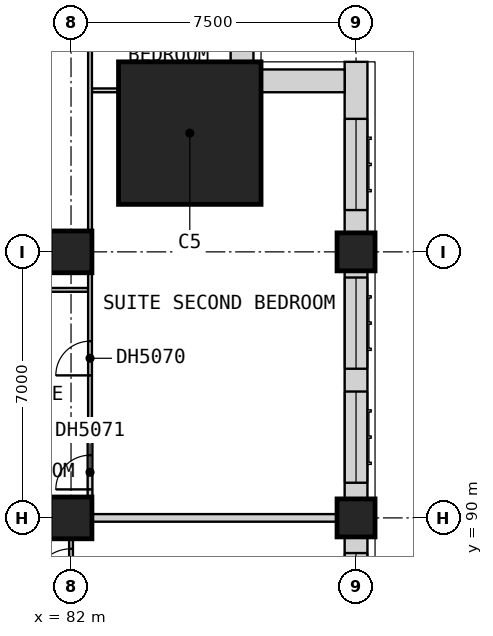
"""IFC4 building model, lengths in metres.
Left out: names, types, materials, properties, quantities, classifications, styles, units other than length and angle.
Written with IfcOpenShell. Run it as: python <this file> out.ifc"""

import sys

from ifc_helpers import new_model, si_unit, direction, frame, frame_2d, origin, origin_2d, place, context, subcontext, project, spatial, rectangle, extrude, element, fill, save


model = new_model("IFC4")
c1 = context("Model", 3, precision=1e-05, world=origin(), true_north=direction((0.0, 1.0)))
c2 = subcontext(c1, "Body", "Model", "MODEL_VIEW")
j1 = project(units=[si_unit("LENGTHUNIT", "METRE"), si_unit("PLANEANGLEUNIT", "RADIAN")], contexts=[c1])
p1 = place(None, origin())
s1 = spatial("IfcSite", under=j1, at=p1, CompositionType="ELEMENT")
p2 = place(p1, origin())
s2 = spatial("IfcBuilding", under=s1, at=p2, CompositionType="ELEMENT")
p3 = place(p2, frame((0.0, 0.0, 93.5)))
s3 = spatial("IfcBuildingStorey", under=s2, at=p3, CompositionType="ELEMENT", Elevation=93.5)
for number, where, z_axis, x_axis in (
    (1, (82.0, 90.0, 0.0), (0.0, 0.0, 1.0), (1.0, 0.0, 0.0)),
    (2, (82.0, 97.0, 0.0), (0.0, 0.0, 1.0), (1.0, 0.0, 0.0)),
):
    element("IfcColumn", number, at=place(p3, frame(where, z_axis=z_axis, x_axis=x_axis)), inside=s3, PredefinedType="COLUMN", context=c2, shape_type="SweptSolid", body=[
        extrude(rectangle(XDim=1.1, YDim=1.1, at=origin_2d()), origin(), (0.0, 0.0, 1.0), 3.6),
    ])
for number, where, z_axis, x_axis in (
    (3, (89.5, 90.0, 0.0), (0.0, 0.0, 1.0), (1.0, 0.0, 0.0)),
    (4, (89.5, 97.0, 0.0), (0.0, 0.0, 1.0), (1.0, 0.0, 0.0)),
):
    element("IfcColumn", number, at=place(p3, frame(where, z_axis=z_axis, x_axis=x_axis)), inside=s3, PredefinedType="COLUMN", context=c2, shape_type="SweptSolid", body=[
        extrude(rectangle(XDim=1.0, YDim=1.0, at=origin_2d()), origin(), (0.0, 0.0, 1.0), 3.6),
    ])
p4 = place(p3, frame((85.125, 100.125, 0.0), z_axis=(0.0, 0.0, 1.0), x_axis=(1.0, 0.0, 0.0)))
e5 = element("IfcColumn", 5, at=p4, inside=s3, PredefinedType="COLUMN", context=c2, shape_type="SweptSolid", body=[
    extrude(rectangle(XDim=3.75, YDim=3.75, at=origin_2d()), origin(), (0.0, 0.0, 1.0), 3.6),
])
p5 = place(p3, frame((89.5, 83.0, 0.0), z_axis=(0.0, 0.0, 1.0), x_axis=(0.0, 1.0, 0.0)))
e6 = element("IfcWall", 6, at=p5, inside=s3, PredefinedType="SOLIDWALL", context=c2, shape_type="SweptSolid", body=[
    extrude(rectangle(XDim=6.5, YDim=0.6, at=frame_2d((3.25, 0.0))), origin(), (0.0, 0.0, 1.0), 2.85),
])
p6 = place(p5, frame((0.425, 0.0, 0.8)))
e7 = element("IfcOpeningElement", 7, at=p6, cuts=e6, PredefinedType="OPENING", context=c2, shape_type="SweptSolid", body=[
    extrude(rectangle(XDim=2.4, YDim=1.8, at=frame_2d((1.2, 0.9))), frame((0.0, 0.31, 0.0), z_axis=(0.0, -1.0, 0.0), x_axis=(1.0, 0.0, 0.0)), (0.0, 0.0, 1.0), 0.62),
])
p7 = place(p5, frame((3.675, 0.0, 0.8)))
e8 = element("IfcOpeningElement", 8, at=p7, cuts=e6, PredefinedType="OPENING", context=c2, shape_type="SweptSolid", body=[
    extrude(rectangle(XDim=2.4, YDim=1.8, at=frame_2d((1.2, 0.9))), frame((0.0, 0.31, 0.0), z_axis=(0.0, -1.0, 0.0), x_axis=(1.0, 0.0, 0.0)), (0.0, 0.0, 1.0), 0.62),
])
p8 = place(p3, frame((89.5, 90.5, 0.0), z_axis=(0.0, 0.0, 1.0), x_axis=(0.0, 1.0, 0.0)))
e9 = element("IfcWall", 9, at=p8, inside=s3, PredefinedType="SOLIDWALL", context=c2, shape_type="SweptSolid", body=[
    extrude(rectangle(XDim=6.0, YDim=0.6, at=frame_2d((3.0, 0.0))), origin(), (0.0, 0.0, 1.0), 2.85),
])
p9 = place(p8, frame((0.425, 0.0, 0.8)))
e10 = element("IfcOpeningElement", 10, at=p9, cuts=e9, PredefinedType="OPENING", context=c2, shape_type="SweptSolid", body=[
    extrude(rectangle(XDim=2.4, YDim=1.8, at=frame_2d((1.2, 0.9))), frame((0.0, 0.31, 0.0), z_axis=(0.0, -1.0, 0.0), x_axis=(1.0, 0.0, 0.0)), (0.0, 0.0, 1.0), 0.62),
])
p10 = place(p8, frame((3.425, 0.0, 0.8)))
e11 = element("IfcOpeningElement", 11, at=p10, cuts=e9, PredefinedType="OPENING", context=c2, shape_type="SweptSolid", body=[
    extrude(rectangle(XDim=2.4, YDim=1.8, at=frame_2d((1.2, 0.9))), frame((0.0, 0.31, 0.0), z_axis=(0.0, -1.0, 0.0), x_axis=(1.0, 0.0, 0.0)), (0.0, 0.0, 1.0), 0.62),
])
p11 = place(p3, frame((89.5, 97.5, 0.0), z_axis=(0.0, 0.0, 1.0), x_axis=(0.0, 1.0, 0.0)))
e12 = element("IfcWall", 12, at=p11, inside=s3, PredefinedType="SOLIDWALL", context=c2, shape_type="SweptSolid", body=[
    extrude(rectangle(XDim=4.5, YDim=0.6, at=frame_2d((2.25, 0.0))), origin(), (0.0, 0.0, 1.0), 2.85),
])
p12 = place(p11, frame((0.6, 0.0, 0.8)))
e13 = element("IfcOpeningElement", 13, at=p12, cuts=e12, PredefinedType="OPENING", context=c2, shape_type="SweptSolid", body=[
    extrude(rectangle(XDim=2.4, YDim=1.8, at=frame_2d((1.2, 0.9))), frame((0.0, 0.31, 0.0), z_axis=(0.0, -1.0, 0.0), x_axis=(1.0, 0.0, 0.0)), (0.0, 0.0, 1.0), 0.62),
])
for number, where, z_axis, x_axis in (
    (14, (89.2, 101.5, 0.0), (0.0, 0.0, 1.0), (-1.0, 0.0, 0.0)),
    (15, (86.5, 102.0, 0.0), (0.0, 0.0, 1.0), (0.0, 1.0, 0.0)),
):
    element("IfcWall", number, at=place(p3, frame(where, z_axis=z_axis, x_axis=x_axis)), inside=s3, PredefinedType="SOLIDWALL", context=c2, shape_type="SweptSolid", body=[
        extrude(rectangle(XDim=2.2, YDim=0.6, at=frame_2d((1.1, 0.0))), origin(), (0.0, 0.0, 1.0), 3.35),
    ])
p13 = place(p3, frame((77.475, 90.0, 0.0), z_axis=(0.0, 0.0, 1.0), x_axis=(1.0, 0.0, 0.0)))
e16 = element("IfcWall", 16, at=p13, inside=s3, PredefinedType="PARTITIONING", context=c2, shape_type="SweptSolid", body=[
    extrude(rectangle(XDim=12.525, YDim=0.2, at=frame_2d((6.262, 0.0))), origin(), (0.0, 0.0, 1.0), 3.35),
])
p14 = place(p3, frame((75.1, 96.0, 0.0), z_axis=(0.0, 0.0, 1.0), x_axis=(1.0, 0.0, 0.0)))
e17 = element("IfcWall", 17, at=p14, inside=s3, PredefinedType="PARTITIONING", context=c2, shape_type="SweptSolid", body=[
    extrude(rectangle(XDim=7.35, YDim=0.1, at=frame_2d((3.675, 0.0))), origin(), (0.0, 0.0, 1.0), 3.35),
])
p15 = place(p14, frame((0.65, 0.0, 0.0)))
e18 = element("IfcOpeningElement", 18, at=p15, cuts=e17, PredefinedType="OPENING", context=c2, shape_type="SweptSolid", body=[
    extrude(rectangle(XDim=0.9, YDim=2.1, at=frame_2d((0.45, 1.05))), frame((0.0, 0.06, 0.0), z_axis=(0.0, -1.0, 0.0), x_axis=(1.0, 0.0, 0.0)), (0.0, 0.0, 1.0), 0.12),
])
p16 = place(p3, frame((82.55, 101.25, 0.0), z_axis=(0.0, 0.0, 1.0), x_axis=(1.0, 0.0, 0.0)))
e19 = element("IfcWall", 19, at=p16, inside=s3, PredefinedType="PARTITIONING", context=c2, shape_type="SweptSolid", body=[
    extrude(rectangle(XDim=4.44, YDim=0.1, at=frame_2d((2.22, 0.0))), origin(), (0.0, 0.0, 1.0), 3.35),
])
p17 = place(p3, frame((82.0, 87.438, 0.0), z_axis=(0.0, 0.0, 1.0), x_axis=(0.0, 1.0, 0.0)))
e20 = element("IfcWall", 20, at=p17, inside=s3, PredefinedType="PARTITIONING", context=c2, shape_type="SweptSolid", body=[
    extrude(rectangle(XDim=2.462, YDim=0.1, at=frame_2d((1.231, 0.0))), origin(), (0.0, 0.0, 1.0), 3.35),
])
p18 = place(p17, frame((0.75, 0.0, 0.0)))
e21 = element("IfcOpeningElement", 21, at=p18, cuts=e20, PredefinedType="OPENING", context=c2, shape_type="SweptSolid", body=[
    extrude(rectangle(XDim=1.0, YDim=2.1, at=frame_2d((0.5, 1.05))), frame((0.0, 0.06, 0.0), z_axis=(0.0, -1.0, 0.0), x_axis=(1.0, 0.0, 0.0)), (0.0, 0.0, 1.0), 0.12),
])
p19 = place(p3, frame((82.5, 92.462, 0.0), z_axis=(0.0, 0.0, 1.0), x_axis=(0.0, 1.0, 0.0)))
e22 = element("IfcWall", 22, at=p19, inside=s3, PredefinedType="PARTITIONING", context=c2, shape_type="SweptSolid", body=[
    extrude(rectangle(XDim=11.728, YDim=0.1, at=frame_2d((5.864, 0.0))), origin(), (0.0, 0.0, 1.0), 3.35),
])
p20 = place(p19, frame((10.212, 0.0, 0.0)))
e23 = element("IfcOpeningElement", 23, at=p20, cuts=e22, PredefinedType="OPENING", context=c2, shape_type="SweptSolid", body=[
    extrude(rectangle(XDim=0.9, YDim=2.1, at=frame_2d((0.45, 1.05))), frame((0.0, 0.06, 0.0), z_axis=(0.0, -1.0, 0.0), x_axis=(1.0, 0.0, 0.0)), (0.0, 0.0, 1.0), 0.12),
])
p21 = place(p19, frame((1.288, 0.0, 0.0)))
e24 = element("IfcOpeningElement", 24, at=p21, cuts=e22, PredefinedType="OPENING", context=c2, shape_type="SweptSolid", body=[
    extrude(rectangle(XDim=0.9, YDim=2.1, at=frame_2d((0.45, 1.05))), frame((0.0, 0.06, 0.0), z_axis=(0.0, -1.0, 0.0), x_axis=(1.0, 0.0, 0.0)), (0.0, 0.0, 1.0), 0.12),
])
p22 = place(p3, frame((77.475, 92.4, 0.0), z_axis=(0.0, 0.0, 1.0), x_axis=(1.0, 0.0, 0.0)))
e25 = element("IfcWall", 25, at=p22, inside=s3, PredefinedType="PARTITIONING", context=c2, shape_type="SweptSolid", body=[
    extrude(rectangle(XDim=5.025, YDim=0.125, at=frame_2d((2.512, 0.0))), origin(), (0.0, 0.0, 1.0), 3.35),
])
p23 = place(p3, frame((82.5, 90.1, 0.0), z_axis=(0.0, 0.0, 1.0), x_axis=(0.0, 1.0, 0.0)))
e26 = element("IfcWall", 26, at=p23, inside=s3, PredefinedType="PARTITIONING", context=c2, shape_type="SweptSolid", body=[
    extrude(rectangle(XDim=2.237, YDim=0.125, at=frame_2d((1.119, 0.0))), origin(), (0.0, 0.0, 1.0), 3.35),
])
p24 = place(p23, frame((0.65, 0.0, 0.0)))
e27 = element("IfcOpeningElement", 27, at=p24, cuts=e26, PredefinedType="OPENING", context=c2, shape_type="SweptSolid", body=[
    extrude(rectangle(XDim=0.9, YDim=2.1, at=frame_2d((0.45, 1.05))), frame((0.0, 0.073, 0.0), z_axis=(0.0, -1.0, 0.0), x_axis=(1.0, 0.0, 0.0)), (0.0, 0.0, 1.0), 0.145),
])
p25 = place(p7, origin())
e28 = element("IfcWindow", 28, at=p25, inside=s3, PartitioningType="SINGLE_PANEL", PredefinedType="WINDOW", context=c2, shape_type="SweptSolid", body=[
    extrude(rectangle(XDim=2.4, YDim=1.8, at=frame_2d((1.2, 0.9))), frame((0.0, -0.07, 0.0), z_axis=(0.0, -1.0, 0.0), x_axis=(1.0, 0.0, 0.0)), (0.0, 0.0, 1.0), 0.06),
])
fill(e8, e28)
p26 = place(p9, origin())
e29 = element("IfcWindow", 29, at=p26, inside=s3, PartitioningType="SINGLE_PANEL", PredefinedType="WINDOW", context=c2, shape_type="SweptSolid", body=[
    extrude(rectangle(XDim=2.4, YDim=1.8, at=frame_2d((1.2, 0.9))), frame((0.0, -0.07, 0.0), z_axis=(0.0, -1.0, 0.0), x_axis=(1.0, 0.0, 0.0)), (0.0, 0.0, 1.0), 0.06),
])
fill(e10, e29)
p27 = place(p10, origin())
e30 = element("IfcWindow", 30, at=p27, inside=s3, PartitioningType="SINGLE_PANEL", PredefinedType="WINDOW", context=c2, shape_type="SweptSolid", body=[
    extrude(rectangle(XDim=2.4, YDim=1.8, at=frame_2d((1.2, 0.9))), frame((0.0, -0.07, 0.0), z_axis=(0.0, -1.0, 0.0), x_axis=(1.0, 0.0, 0.0)), (0.0, 0.0, 1.0), 0.06),
])
fill(e11, e30)
p28 = place(p12, origin())
e31 = element("IfcWindow", 31, at=p28, inside=s3, PartitioningType="SINGLE_PANEL", PredefinedType="WINDOW", context=c2, shape_type="SweptSolid", body=[
    extrude(rectangle(XDim=2.4, YDim=1.8, at=frame_2d((1.2, 0.9))), frame((0.0, -0.07, 0.0), z_axis=(0.0, -1.0, 0.0), x_axis=(1.0, 0.0, 0.0)), (0.0, 0.0, 1.0), 0.06),
])
fill(e13, e31)
p29 = place(p18, origin())
e32 = element("IfcDoor", 32, at=p29, inside=s3, OperationType="SINGLE_SWING_LEFT", PredefinedType="DOOR", context=c2, shape_type="SweptSolid", body=[
    extrude(rectangle(XDim=1.0, YDim=2.1, at=frame_2d((0.5, 1.05))), frame((0.0, 0.025, 0.0), z_axis=(0.0, -1.0, 0.0), x_axis=(1.0, 0.0, 0.0)), (0.0, 0.0, 1.0), 0.05),
])
fill(e21, e32)
p30 = place(p21, origin())
e33 = element("IfcDoor", 33, at=p30, inside=s3, OperationType="SINGLE_SWING_RIGHT", PredefinedType="DOOR", context=c2, shape_type="SweptSolid", body=[
    extrude(rectangle(XDim=0.9, YDim=2.1, at=frame_2d((0.45, 1.05))), frame((0.0, 0.025, 0.0), z_axis=(0.0, -1.0, 0.0), x_axis=(1.0, 0.0, 0.0)), (0.0, 0.0, 1.0), 0.05),
])
fill(e24, e33)
p31 = place(p24, origin())
e34 = element("IfcDoor", 34, at=p31, inside=s3, OperationType="SINGLE_SWING_LEFT", PredefinedType="DOOR", context=c2, shape_type="SweptSolid", body=[
    extrude(rectangle(XDim=0.9, YDim=2.1, at=frame_2d((0.45, 1.05))), frame((0.0, 0.025, 0.0), z_axis=(0.0, -1.0, 0.0), x_axis=(1.0, 0.0, 0.0)), (0.0, 0.0, 1.0), 0.05),
])
fill(e27, e34)
save(model, sys.argv[1])
